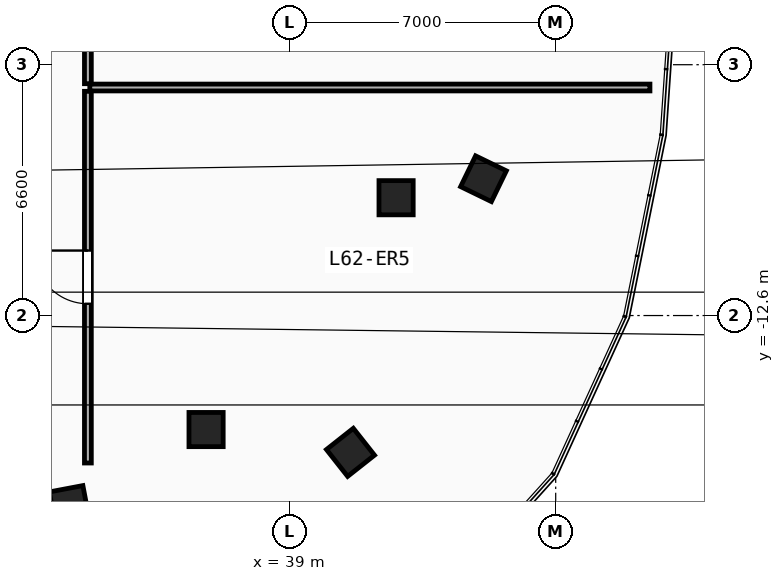
"""IFC4 building model, lengths in metres.
Left out: names, types, materials, properties, quantities, classifications, styles, units other than length and angle.
Written with IfcOpenShell. Run it as: python <this file> out.ifc"""

import sys

from ifc_helpers import new_model, si_unit, direction, frame, frame_2d, origin, origin_2d, place, context, subcontext, project, spatial, rectangle, extrude, element, fill, save


model = new_model("IFC4")
c1 = context("Model", 3, precision=1e-05, world=origin(), true_north=direction((0.0, 1.0)))
c2 = subcontext(c1, "Body", "Model", "MODEL_VIEW")
j1 = project(units=[si_unit("LENGTHUNIT", "METRE"), si_unit("PLANEANGLEUNIT", "RADIAN")], contexts=[c1])
p1 = place(None, origin())
s1 = spatial("IfcSite", under=j1, at=p1, CompositionType="ELEMENT")
p2 = place(p1, origin())
s2 = spatial("IfcBuilding", under=s1, at=p2, CompositionType="ELEMENT")
p3 = place(p2, frame((0.0, 0.0, 235.0)))
s3 = spatial("IfcBuildingStorey", under=s2, at=p3, CompositionType="ELEMENT", Elevation=235.0)
for number, where, z_axis, x_axis in (
    (1, (41.8, -9.5, 0.0), (0.0, 0.0, 1.0), (1.0, 0.0, 0.0)),
    (2, (36.8, -15.6, 0.0), (0.0, 0.0, 1.0), (1.0, 0.0, 0.0)),
    (3, (33.2, -17.6, 0.0), (0.0, 0.0, 1.0), (0.983, 0.186, 0.0)),
    (4, (40.6, -16.2, 0.0), (0.0, 0.0, 1.0), (0.785, 0.619, 0.0)),
    (5, (44.1, -9.0, 0.0), (0.0, 0.0, 1.0), (0.437, 0.899, 0.0)),
):
    element("IfcColumn", number, at=place(p3, frame(where, z_axis=z_axis, x_axis=x_axis)), inside=s3, PredefinedType="COLUMN", context=c2, shape_type="SweptSolid", body=[
        extrude(rectangle(XDim=0.9, YDim=0.9, at=origin_2d()), origin(), (0.0, 0.0, 1.0), 4.6),
    ])
p4 = place(p3, frame((33.74, -6.6, 0.0), z_axis=(0.0, 0.0, 1.0), x_axis=(1.0, 0.0, 0.0)))
e6 = element("IfcWall", 6, at=p4, inside=s3, PredefinedType="PARTITIONING", context=c2, shape_type="SweptSolid", body=[
    extrude(rectangle(XDim=14.74, YDim=0.18, at=frame_2d((7.37, 0.0))), origin(), (0.0, 0.0, 1.0), 4.34),
])
p5 = place(p3, frame((33.69, -6.5, 0.0), z_axis=(0.0, 0.0, 1.0), x_axis=(0.0, 1.0, 0.0)))
e7 = element("IfcWall", 7, at=p5, inside=s3, PredefinedType="PARTITIONING", context=c2, shape_type="SweptSolid", body=[
    extrude(rectangle(XDim=4.32, YDim=0.18, at=frame_2d((2.16, 0.0))), origin(), (0.0, 0.0, 1.0), 4.34),
])
p6 = place(p3, frame((33.69, -16.48, 0.0), z_axis=(0.0, 0.0, 1.0), x_axis=(0.0, 1.0, 0.0)))
e8 = element("IfcWall", 8, at=p6, inside=s3, PredefinedType="PARTITIONING", context=c2, shape_type="SweptSolid", body=[
    extrude(rectangle(XDim=9.78, YDim=0.18, at=frame_2d((4.89, 0.0))), origin(), (0.0, 0.0, 1.0), 4.34),
])
p7 = place(p6, frame((4.19, 0.0, 0.0)))
e9 = element("IfcOpeningElement", 9, at=p7, cuts=e8, PredefinedType="OPENING", context=c2, shape_type="SweptSolid", body=[
    extrude(rectangle(XDim=1.4, YDim=2.2, at=frame_2d((0.7, 1.1))), frame((0.0, 0.1, 0.0), z_axis=(0.0, -1.0, 0.0), x_axis=(1.0, 0.0, 0.0)), (0.0, 0.0, 1.0), 0.2),
])
p8 = place(p7, origin())
e10 = element("IfcDoor", 10, at=p8, inside=s3, OperationType="SINGLE_SWING_RIGHT", PredefinedType="DOOR", context=c2, shape_type="SweptSolid", body=[
    extrude(rectangle(XDim=1.4, YDim=2.2, at=frame_2d((0.7, 1.1))), frame((0.0, 0.025, 0.0), z_axis=(0.0, -1.0, 0.0), x_axis=(1.0, 0.0, 0.0)), (0.0, 0.0, 1.0), 0.05),
])
fill(e9, e10)
save(model, sys.argv[1])
